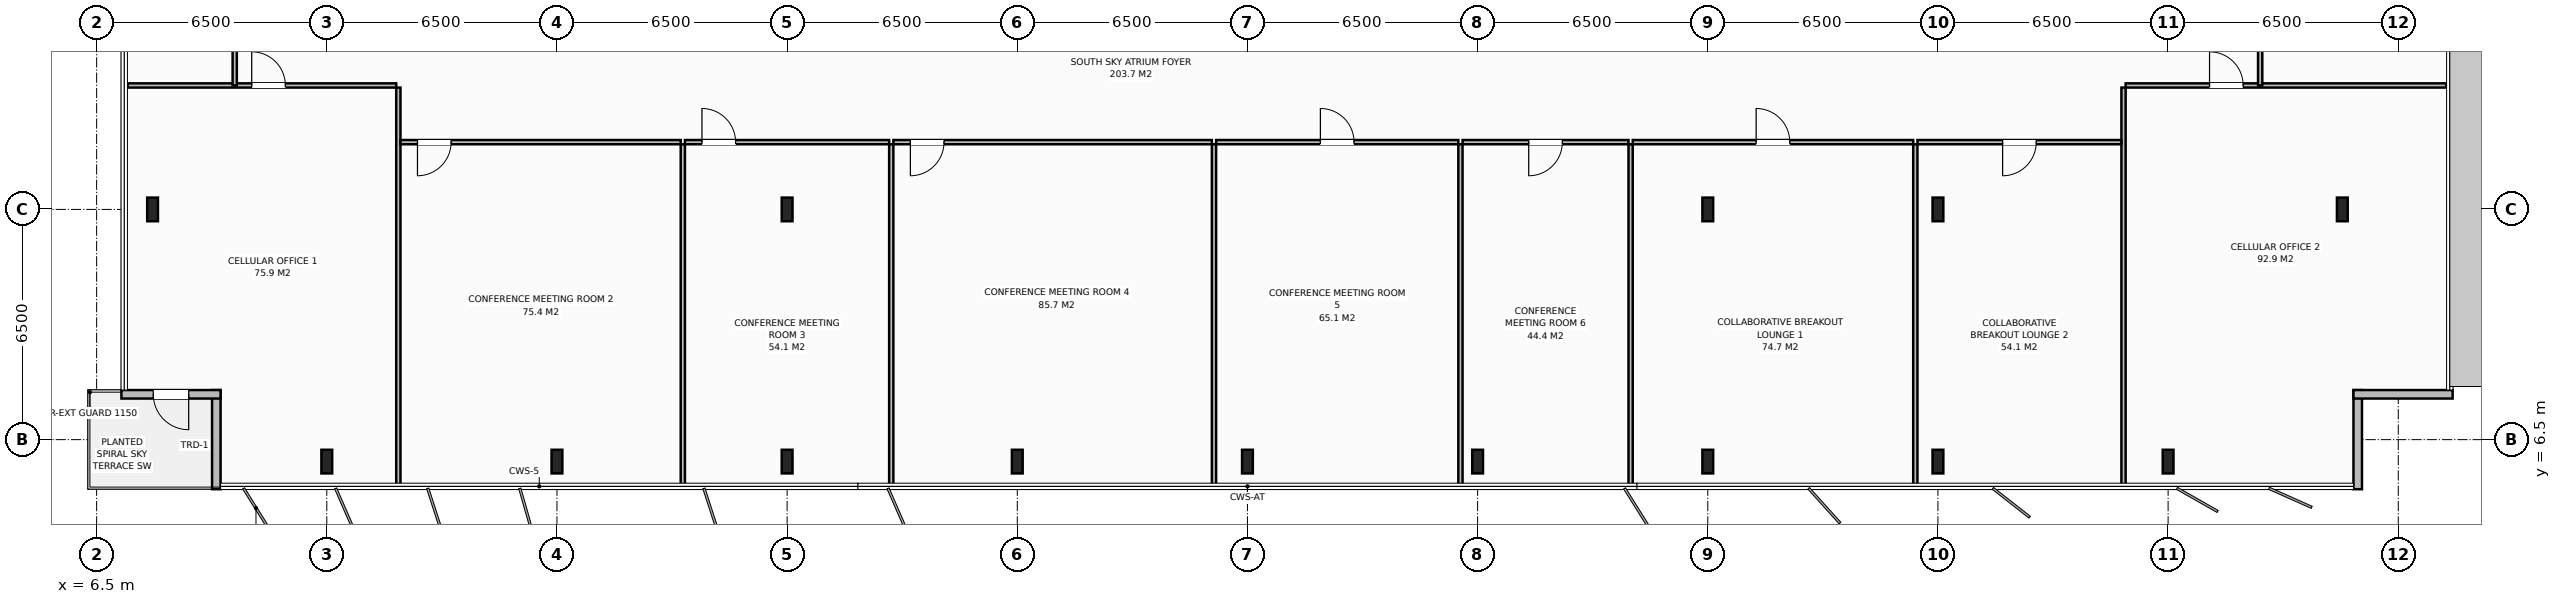
"""IFC4 building model, lengths in metres.
Left out: names, types, materials, properties, quantities, classifications, styles, units other than length and angle.
Written with IfcOpenShell. Run it as: python <this file> out.ifc"""

import sys

from ifc_helpers import new_model, si_unit, direction, frame, frame_2d, origin, origin_2d, place, context, subcontext, project, spatial, rectangle, i_section, extrude, element, fill, save


model = new_model("IFC4")
c1 = context("Model", 3, precision=1e-05, world=origin(), true_north=direction((0.0, 1.0)))
c2 = subcontext(c1, "Body", "Model", "MODEL_VIEW")
j1 = project(units=[si_unit("LENGTHUNIT", "METRE"), si_unit("PLANEANGLEUNIT", "RADIAN")], contexts=[c1])
p1 = place(None, origin())
s1 = spatial("IfcSite", under=j1, at=p1, CompositionType="ELEMENT")
p2 = place(p1, origin())
s2 = spatial("IfcBuilding", under=s1, at=p2, CompositionType="ELEMENT")
p3 = place(p2, frame((0.0, 0.0, 286.4)))
s3 = spatial("IfcBuildingStorey", under=s2, at=p3, CompositionType="ELEMENT", Elevation=286.4)
for number, where, z_axis, x_axis in (
    (1, (58.5, 13.0, 0.0), (0.0, 0.0, 1.0), (1.0, 0.0, 0.0)),
    (2, (26.0, 13.0, 0.0), (0.0, 0.0, 1.0), (1.0, 0.0, 0.0)),
    (3, (52.0, 13.0, 0.0), (0.0, 0.0, 1.0), (1.0, 0.0, 0.0)),
    (4, (13.0, 5.88, 0.0), (0.0, 0.0, 1.0), (1.0, 0.0, 0.0)),
    (5, (19.5, 5.88, 0.0), (0.0, 0.0, 1.0), (1.0, 0.0, 0.0)),
    (6, (26.0, 5.88, 0.0), (0.0, 0.0, 1.0), (1.0, 0.0, 0.0)),
    (7, (32.5, 5.88, 0.0), (0.0, 0.0, 1.0), (1.0, 0.0, 0.0)),
    (8, (39.0, 5.88, 0.0), (0.0, 0.0, 1.0), (1.0, 0.0, 0.0)),
    (9, (45.5, 5.88, 0.0), (0.0, 0.0, 1.0), (1.0, 0.0, 0.0)),
    (10, (52.0, 5.88, 0.0), (0.0, 0.0, 1.0), (1.0, 0.0, 0.0)),
    (11, (58.5, 5.88, 0.0), (0.0, 0.0, 1.0), (1.0, 0.0, 0.0)),
    (12, (65.0, 5.88, 0.0), (0.0, 0.0, 1.0), (1.0, 0.0, 0.0)),
    (13, (8.08, 13.0, 0.0), (0.0, 0.0, 1.0), (1.0, 0.0, 0.0)),
    (14, (69.92, 13.0, 0.0), (0.0, 0.0, 1.0), (1.0, 0.0, 0.0)),
):
    element("IfcColumn", number, at=place(p3, frame(where, z_axis=z_axis, x_axis=x_axis)), inside=s3, PredefinedType="COLUMN", context=c2, shape_type="SweptSolid", body=[
        extrude(i_section(OverallWidth=0.305, OverallDepth=0.668, WebThickness=0.021, FlangeThickness=0.04, at=origin_2d()), origin(), (0.0, 0.0, 1.0), 4.0),
    ])
p4 = place(p3, frame((9.88, 5.1, 0.0), z_axis=(0.0, 0.0, 1.0), x_axis=(0.0, 1.0, 0.0)))
e15 = element("IfcWall", 15, at=p4, inside=s3, PredefinedType="STANDARD", context=c2, shape_type="SweptSolid", body=[
    extrude(rectangle(XDim=2.8, YDim=0.24, at=frame_2d((1.4, 0.0))), origin(), (0.0, 0.0, 1.0), 3.788),
])
p5 = place(p3, frame((10.0, 7.78, 0.0), z_axis=(0.0, 0.0, 1.0), x_axis=(-1.0, 0.0, 0.0)))
e16 = element("IfcWall", 16, at=p5, inside=s3, PredefinedType="STANDARD", context=c2, shape_type="SweptSolid", body=[
    extrude(rectangle(XDim=2.8, YDim=0.24, at=frame_2d((1.4, 0.0))), origin(), (0.0, 0.0, 1.0), 3.788),
])
p6 = place(p5, frame((0.9, 0.0, 0.0)))
e17 = element("IfcOpeningElement", 17, at=p6, cuts=e16, PredefinedType="OPENING", context=c2, shape_type="SweptSolid", body=[
    extrude(rectangle(XDim=1.0, YDim=2.2, at=frame_2d((0.5, 1.1))), frame((0.0, 0.13, 0.0), z_axis=(0.0, -1.0, 0.0), x_axis=(1.0, 0.0, 0.0)), (0.0, 0.0, 1.0), 0.26),
])
p7 = place(p3, frame((70.355, 7.9, 0.0), z_axis=(0.0, 0.0, 1.0), x_axis=(0.0, -1.0, 0.0)))
e18 = element("IfcWall", 18, at=p7, inside=s3, PredefinedType="STANDARD", context=c2, shape_type="SweptSolid", body=[
    extrude(rectangle(XDim=2.8, YDim=0.24, at=frame_2d((1.4, 0.0))), origin(), (0.0, 0.0, 1.0), 3.788),
])
p8 = place(p3, frame((73.035, 7.78, 0.0), z_axis=(0.0, 0.0, 1.0), x_axis=(-1.0, 0.0, 0.0)))
e19 = element("IfcWall", 19, at=p8, inside=s3, PredefinedType="STANDARD", context=c2, shape_type="SweptSolid", body=[
    extrude(rectangle(XDim=2.8, YDim=0.24, at=frame_2d((1.4, 0.0))), origin(), (0.0, 0.0, 1.0), 3.788),
])
p9 = place(p3, frame((15.021, 5.12, 0.0), z_axis=(0.0, 0.0, 1.0), x_axis=(0.0, 1.0, 0.0)))
e20 = element("IfcWall", 20, at=p9, inside=s3, PredefinedType="PARTITIONING", context=c2, shape_type="SweptSolid", body=[
    extrude(rectangle(XDim=11.32, YDim=0.12, at=frame_2d((5.66, 0.0))), origin(), (0.0, 0.0, 1.0), 3.788),
])
p10 = place(p3, frame((7.38, 16.5, 0.0), z_axis=(0.0, 0.0, 1.0), x_axis=(1.0, 0.0, 0.0)))
e21 = element("IfcWall", 21, at=p10, inside=s3, PredefinedType="PARTITIONING", context=c2, shape_type="SweptSolid", body=[
    extrude(rectangle(XDim=7.581, YDim=0.12, at=frame_2d((3.791, 0.0))), origin(), (0.0, 0.0, 1.0), 3.788),
])
p11 = place(p10, frame((3.5, 0.0, 0.0)))
e22 = element("IfcOpeningElement", 22, at=p11, cuts=e21, PredefinedType="OPENING", context=c2, shape_type="SweptSolid", body=[
    extrude(rectangle(XDim=0.95, YDim=2.15, at=frame_2d((0.475, 1.075))), frame((0.0, 0.07, 0.0), z_axis=(0.0, -1.0, 0.0), x_axis=(1.0, 0.0, 0.0)), (0.0, 0.0, 1.0), 0.14),
])
p12 = place(p3, frame((23.055, 5.12, 0.0), z_axis=(0.0, 0.0, 1.0), x_axis=(0.0, 1.0, 0.0)))
e23 = element("IfcWall", 23, at=p12, inside=s3, PredefinedType="PARTITIONING", context=c2, shape_type="SweptSolid", body=[
    extrude(rectangle(XDim=9.72, YDim=0.12, at=frame_2d((4.86, 0.0))), origin(), (0.0, 0.0, 1.0), 3.788),
])
p13 = place(p3, frame((15.081, 14.9, 0.0), z_axis=(0.0, 0.0, 1.0), x_axis=(1.0, 0.0, 0.0)))
e24 = element("IfcWall", 24, at=p13, inside=s3, PredefinedType="PARTITIONING", context=c2, shape_type="SweptSolid", body=[
    extrude(rectangle(XDim=7.914, YDim=0.12, at=frame_2d((3.957, 0.0))), origin(), (0.0, 0.0, 1.0), 3.788),
])
p14 = place(p13, frame((0.48, 0.0, 0.0)))
e25 = element("IfcOpeningElement", 25, at=p14, cuts=e24, PredefinedType="OPENING", context=c2, shape_type="SweptSolid", body=[
    extrude(rectangle(XDim=0.95, YDim=2.15, at=frame_2d((0.475, 1.075))), frame((0.0, 0.07, 0.0), z_axis=(0.0, -1.0, 0.0), x_axis=(1.0, 0.0, 0.0)), (0.0, 0.0, 1.0), 0.14),
])
p15 = place(p3, frame((28.941, 5.12, 0.0), z_axis=(0.0, 0.0, 1.0), x_axis=(0.0, 1.0, 0.0)))
e26 = element("IfcWall", 26, at=p15, inside=s3, PredefinedType="PARTITIONING", context=c2, shape_type="SweptSolid", body=[
    extrude(rectangle(XDim=9.72, YDim=0.12, at=frame_2d((4.86, 0.0))), origin(), (0.0, 0.0, 1.0), 3.788),
])
p16 = place(p3, frame((23.115, 14.9, 0.0), z_axis=(0.0, 0.0, 1.0), x_axis=(1.0, 0.0, 0.0)))
e27 = element("IfcWall", 27, at=p16, inside=s3, PredefinedType="PARTITIONING", context=c2, shape_type="SweptSolid", body=[
    extrude(rectangle(XDim=5.766, YDim=0.12, at=frame_2d((2.883, 0.0))), origin(), (0.0, 0.0, 1.0), 3.788),
])
p17 = place(p16, frame((0.48, 0.0, 0.0)))
e28 = element("IfcOpeningElement", 28, at=p17, cuts=e27, PredefinedType="OPENING", context=c2, shape_type="SweptSolid", body=[
    extrude(rectangle(XDim=0.95, YDim=2.15, at=frame_2d((0.475, 1.075))), frame((0.0, 0.07, 0.0), z_axis=(0.0, -1.0, 0.0), x_axis=(1.0, 0.0, 0.0)), (0.0, 0.0, 1.0), 0.14),
])
p18 = place(p3, frame((38.055, 5.12, 0.0), z_axis=(0.0, 0.0, 1.0), x_axis=(0.0, 1.0, 0.0)))
e29 = element("IfcWall", 29, at=p18, inside=s3, PredefinedType="PARTITIONING", context=c2, shape_type="SweptSolid", body=[
    extrude(rectangle(XDim=9.72, YDim=0.12, at=frame_2d((4.86, 0.0))), origin(), (0.0, 0.0, 1.0), 3.788),
])
p19 = place(p3, frame((29.001, 14.9, 0.0), z_axis=(0.0, 0.0, 1.0), x_axis=(1.0, 0.0, 0.0)))
e30 = element("IfcWall", 30, at=p19, inside=s3, PredefinedType="PARTITIONING", context=c2, shape_type="SweptSolid", body=[
    extrude(rectangle(XDim=8.994, YDim=0.12, at=frame_2d((4.497, 0.0))), origin(), (0.0, 0.0, 1.0), 3.788),
])
p20 = place(p19, frame((0.48, 0.0, 0.0)))
e31 = element("IfcOpeningElement", 31, at=p20, cuts=e30, PredefinedType="OPENING", context=c2, shape_type="SweptSolid", body=[
    extrude(rectangle(XDim=0.95, YDim=2.15, at=frame_2d((0.475, 1.075))), frame((0.0, 0.07, 0.0), z_axis=(0.0, -1.0, 0.0), x_axis=(1.0, 0.0, 0.0)), (0.0, 0.0, 1.0), 0.14),
])
p21 = place(p3, frame((45.015, 5.12, 0.0), z_axis=(0.0, 0.0, 1.0), x_axis=(0.0, 1.0, 0.0)))
e32 = element("IfcWall", 32, at=p21, inside=s3, PredefinedType="PARTITIONING", context=c2, shape_type="SweptSolid", body=[
    extrude(rectangle(XDim=9.72, YDim=0.12, at=frame_2d((4.86, 0.0))), origin(), (0.0, 0.0, 1.0), 3.788),
])
p22 = place(p3, frame((38.115, 14.9, 0.0), z_axis=(0.0, 0.0, 1.0), x_axis=(1.0, 0.0, 0.0)))
e33 = element("IfcWall", 33, at=p22, inside=s3, PredefinedType="PARTITIONING", context=c2, shape_type="SweptSolid", body=[
    extrude(rectangle(XDim=6.84, YDim=0.12, at=frame_2d((3.42, 0.0))), origin(), (0.0, 0.0, 1.0), 3.788),
])
p23 = place(p22, frame((2.945, 0.0, 0.0)))
e34 = element("IfcOpeningElement", 34, at=p23, cuts=e33, PredefinedType="OPENING", context=c2, shape_type="SweptSolid", body=[
    extrude(rectangle(XDim=0.95, YDim=2.15, at=frame_2d((0.475, 1.075))), frame((0.0, 0.07, 0.0), z_axis=(0.0, -1.0, 0.0), x_axis=(1.0, 0.0, 0.0)), (0.0, 0.0, 1.0), 0.14),
])
p24 = place(p3, frame((49.821, 5.12, 0.0), z_axis=(0.0, 0.0, 1.0), x_axis=(0.0, 1.0, 0.0)))
e35 = element("IfcWall", 35, at=p24, inside=s3, PredefinedType="PARTITIONING", context=c2, shape_type="SweptSolid", body=[
    extrude(rectangle(XDim=9.72, YDim=0.12, at=frame_2d((4.86, 0.0))), origin(), (0.0, 0.0, 1.0), 3.788),
])
p25 = place(p3, frame((45.075, 14.9, 0.0), z_axis=(0.0, 0.0, 1.0), x_axis=(1.0, 0.0, 0.0)))
e36 = element("IfcWall", 36, at=p25, inside=s3, PredefinedType="PARTITIONING", context=c2, shape_type="SweptSolid", body=[
    extrude(rectangle(XDim=4.686, YDim=0.12, at=frame_2d((2.343, 0.0))), origin(), (0.0, 0.0, 1.0), 3.788),
])
p26 = place(p25, frame((1.868, 0.0, 0.0)))
e37 = element("IfcOpeningElement", 37, at=p26, cuts=e36, PredefinedType="OPENING", context=c2, shape_type="SweptSolid", body=[
    extrude(rectangle(XDim=0.95, YDim=2.15, at=frame_2d((0.475, 1.075))), frame((0.0, 0.07, 0.0), z_axis=(0.0, -1.0, 0.0), x_axis=(1.0, 0.0, 0.0)), (0.0, 0.0, 1.0), 0.14),
])
p27 = place(p3, frame((57.861, 5.12, 0.0), z_axis=(0.0, 0.0, 1.0), x_axis=(0.0, 1.0, 0.0)))
e38 = element("IfcWall", 38, at=p27, inside=s3, PredefinedType="PARTITIONING", context=c2, shape_type="SweptSolid", body=[
    extrude(rectangle(XDim=9.72, YDim=0.12, at=frame_2d((4.86, 0.0))), origin(), (0.0, 0.0, 1.0), 3.788),
])
p28 = place(p3, frame((49.881, 14.9, 0.0), z_axis=(0.0, 0.0, 1.0), x_axis=(1.0, 0.0, 0.0)))
e39 = element("IfcWall", 39, at=p28, inside=s3, PredefinedType="PARTITIONING", context=c2, shape_type="SweptSolid", body=[
    extrude(rectangle(XDim=7.92, YDim=0.12, at=frame_2d((3.96, 0.0))), origin(), (0.0, 0.0, 1.0), 3.788),
])
p29 = place(p28, frame((3.485, 0.0, 0.0)))
e40 = element("IfcOpeningElement", 40, at=p29, cuts=e39, PredefinedType="OPENING", context=c2, shape_type="SweptSolid", body=[
    extrude(rectangle(XDim=0.95, YDim=2.15, at=frame_2d((0.475, 1.075))), frame((0.0, 0.07, 0.0), z_axis=(0.0, -1.0, 0.0), x_axis=(1.0, 0.0, 0.0)), (0.0, 0.0, 1.0), 0.14),
])
p30 = place(p3, frame((63.741, 5.12, 0.0), z_axis=(0.0, 0.0, 1.0), x_axis=(0.0, 1.0, 0.0)))
e41 = element("IfcWall", 41, at=p30, inside=s3, PredefinedType="PARTITIONING", context=c2, shape_type="SweptSolid", body=[
    extrude(rectangle(XDim=11.32, YDim=0.12, at=frame_2d((5.66, 0.0))), origin(), (0.0, 0.0, 1.0), 3.788),
])
p31 = place(p3, frame((57.921, 14.9, 0.0), z_axis=(0.0, 0.0, 1.0), x_axis=(1.0, 0.0, 0.0)))
e42 = element("IfcWall", 42, at=p31, inside=s3, PredefinedType="PARTITIONING", context=c2, shape_type="SweptSolid", body=[
    extrude(rectangle(XDim=5.76, YDim=0.12, at=frame_2d((2.88, 0.0))), origin(), (0.0, 0.0, 1.0), 3.788),
])
p32 = place(p31, frame((2.405, 0.0, 0.0)))
e43 = element("IfcOpeningElement", 43, at=p32, cuts=e42, PredefinedType="OPENING", context=c2, shape_type="SweptSolid", body=[
    extrude(rectangle(XDim=0.95, YDim=2.15, at=frame_2d((0.475, 1.075))), frame((0.0, 0.07, 0.0), z_axis=(0.0, -1.0, 0.0), x_axis=(1.0, 0.0, 0.0)), (0.0, 0.0, 1.0), 0.14),
])
p33 = place(p3, frame((63.801, 16.5, 0.0), z_axis=(0.0, 0.0, 1.0), x_axis=(1.0, 0.0, 0.0)))
e44 = element("IfcWall", 44, at=p33, inside=s3, PredefinedType="PARTITIONING", context=c2, shape_type="SweptSolid", body=[
    extrude(rectangle(XDim=9.054, YDim=0.12, at=frame_2d((4.527, 0.0))), origin(), (0.0, 0.0, 1.0), 3.788),
])
p34 = place(p33, frame((2.369, 0.0, 0.0)))
e45 = element("IfcOpeningElement", 45, at=p34, cuts=e44, PredefinedType="OPENING", context=c2, shape_type="SweptSolid", body=[
    extrude(rectangle(XDim=0.95, YDim=2.15, at=frame_2d((0.475, 1.075))), frame((0.0, 0.07, 0.0), z_axis=(0.0, -1.0, 0.0), x_axis=(1.0, 0.0, 0.0)), (0.0, 0.0, 1.0), 0.14),
])
p35 = place(p3, frame((10.4, 16.5, 0.0), z_axis=(0.0, 0.0, 1.0), x_axis=(0.0, 1.0, 0.0)))
e46 = element("IfcWall", 46, at=p35, inside=s3, PredefinedType="PARTITIONING", context=c2, shape_type="SweptSolid", body=[
    extrude(rectangle(XDim=9.5, YDim=0.12, at=frame_2d((4.75, 0.0))), origin(), (0.0, 0.0, 1.0), 3.788),
])
p36 = place(p35, frame((5.325, 0.0, 0.0)))
e47 = element("IfcOpeningElement", 47, at=p36, cuts=e46, PredefinedType="OPENING", context=c2, shape_type="SweptSolid", body=[
    extrude(rectangle(XDim=0.95, YDim=2.15, at=frame_2d((0.475, 1.075))), frame((0.0, 0.07, 0.0), z_axis=(0.0, -1.0, 0.0), x_axis=(1.0, 0.0, 0.0)), (0.0, 0.0, 1.0), 0.14),
])
p37 = place(p3, frame((67.6, 16.5, 0.0), z_axis=(0.0, 0.0, 1.0), x_axis=(0.0, 1.0, 0.0)))
e48 = element("IfcWall", 48, at=p37, inside=s3, PredefinedType="PARTITIONING", context=c2, shape_type="SweptSolid", body=[
    extrude(rectangle(XDim=19.0, YDim=0.12, at=frame_2d((9.5, 0.0))), origin(), (0.0, 0.0, 1.0), 3.788),
])
p38 = place(p37, frame((9.025, 0.0, 0.0)))
e49 = element("IfcOpeningElement", 49, at=p38, cuts=e48, PredefinedType="OPENING", context=c2, shape_type="SweptSolid", body=[
    extrude(rectangle(XDim=0.95, YDim=2.15, at=frame_2d((0.475, 1.075))), frame((0.0, 0.07, 0.0), z_axis=(0.0, -1.0, 0.0), x_axis=(1.0, 0.0, 0.0)), (0.0, 0.0, 1.0), 0.14),
])
p39 = place(p6, origin())
e50 = element("IfcDoor", 50, at=p39, inside=s3, OperationType="SINGLE_SWING_LEFT", PredefinedType="DOOR", context=c2, shape_type="SweptSolid", body=[
    extrude(rectangle(XDim=1.0, YDim=2.2, at=frame_2d((0.5, 1.1))), frame((0.0, 0.025, 0.0), z_axis=(0.0, -1.0, 0.0), x_axis=(1.0, 0.0, 0.0)), (0.0, 0.0, 1.0), 0.05),
])
fill(e17, e50)
p40 = place(p11, origin())
e51 = element("IfcDoor", 51, at=p40, inside=s3, OperationType="SINGLE_SWING_LEFT", PredefinedType="DOOR", context=c2, shape_type="SweptSolid", body=[
    extrude(rectangle(XDim=0.95, YDim=2.15, at=frame_2d((0.475, 1.075))), frame((0.0, 0.025, 0.0), z_axis=(0.0, -1.0, 0.0), x_axis=(1.0, 0.0, 0.0)), (0.0, 0.0, 1.0), 0.05),
])
fill(e22, e51)
p41 = place(p14, origin())
e52 = element("IfcDoor", 52, at=p41, inside=s3, OperationType="SINGLE_SWING_RIGHT", PredefinedType="DOOR", context=c2, shape_type="SweptSolid", body=[
    extrude(rectangle(XDim=0.95, YDim=2.15, at=frame_2d((0.475, 1.075))), frame((0.0, 0.025, 0.0), z_axis=(0.0, -1.0, 0.0), x_axis=(1.0, 0.0, 0.0)), (0.0, 0.0, 1.0), 0.05),
])
fill(e25, e52)
p42 = place(p17, origin())
e53 = element("IfcDoor", 53, at=p42, inside=s3, OperationType="SINGLE_SWING_LEFT", PredefinedType="DOOR", context=c2, shape_type="SweptSolid", body=[
    extrude(rectangle(XDim=0.95, YDim=2.15, at=frame_2d((0.475, 1.075))), frame((0.0, 0.025, 0.0), z_axis=(0.0, -1.0, 0.0), x_axis=(1.0, 0.0, 0.0)), (0.0, 0.0, 1.0), 0.05),
])
fill(e28, e53)
p43 = place(p20, origin())
e54 = element("IfcDoor", 54, at=p43, inside=s3, OperationType="SINGLE_SWING_RIGHT", PredefinedType="DOOR", context=c2, shape_type="SweptSolid", body=[
    extrude(rectangle(XDim=0.95, YDim=2.15, at=frame_2d((0.475, 1.075))), frame((0.0, 0.025, 0.0), z_axis=(0.0, -1.0, 0.0), x_axis=(1.0, 0.0, 0.0)), (0.0, 0.0, 1.0), 0.05),
])
fill(e31, e54)
p44 = place(p23, origin())
e55 = element("IfcDoor", 55, at=p44, inside=s3, OperationType="SINGLE_SWING_LEFT", PredefinedType="DOOR", context=c2, shape_type="SweptSolid", body=[
    extrude(rectangle(XDim=0.95, YDim=2.15, at=frame_2d((0.475, 1.075))), frame((0.0, 0.025, 0.0), z_axis=(0.0, -1.0, 0.0), x_axis=(1.0, 0.0, 0.0)), (0.0, 0.0, 1.0), 0.05),
])
fill(e34, e55)
p45 = place(p26, origin())
e56 = element("IfcDoor", 56, at=p45, inside=s3, OperationType="SINGLE_SWING_RIGHT", PredefinedType="DOOR", context=c2, shape_type="SweptSolid", body=[
    extrude(rectangle(XDim=0.95, YDim=2.15, at=frame_2d((0.475, 1.075))), frame((0.0, 0.025, 0.0), z_axis=(0.0, -1.0, 0.0), x_axis=(1.0, 0.0, 0.0)), (0.0, 0.0, 1.0), 0.05),
])
fill(e37, e56)
p46 = place(p29, origin())
e57 = element("IfcDoor", 57, at=p46, inside=s3, OperationType="SINGLE_SWING_LEFT", PredefinedType="DOOR", context=c2, shape_type="SweptSolid", body=[
    extrude(rectangle(XDim=0.95, YDim=2.15, at=frame_2d((0.475, 1.075))), frame((0.0, 0.025, 0.0), z_axis=(0.0, -1.0, 0.0), x_axis=(1.0, 0.0, 0.0)), (0.0, 0.0, 1.0), 0.05),
])
fill(e40, e57)
p47 = place(p32, origin())
e58 = element("IfcDoor", 58, at=p47, inside=s3, OperationType="SINGLE_SWING_RIGHT", PredefinedType="DOOR", context=c2, shape_type="SweptSolid", body=[
    extrude(rectangle(XDim=0.95, YDim=2.15, at=frame_2d((0.475, 1.075))), frame((0.0, 0.025, 0.0), z_axis=(0.0, -1.0, 0.0), x_axis=(1.0, 0.0, 0.0)), (0.0, 0.0, 1.0), 0.05),
])
fill(e43, e58)
p48 = place(p34, origin())
e59 = element("IfcDoor", 59, at=p48, inside=s3, OperationType="SINGLE_SWING_LEFT", PredefinedType="DOOR", context=c2, shape_type="SweptSolid", body=[
    extrude(rectangle(XDim=0.95, YDim=2.15, at=frame_2d((0.475, 1.075))), frame((0.0, 0.025, 0.0), z_axis=(0.0, -1.0, 0.0), x_axis=(1.0, 0.0, 0.0)), (0.0, 0.0, 1.0), 0.05),
])
fill(e45, e59)
save(model, sys.argv[1])
